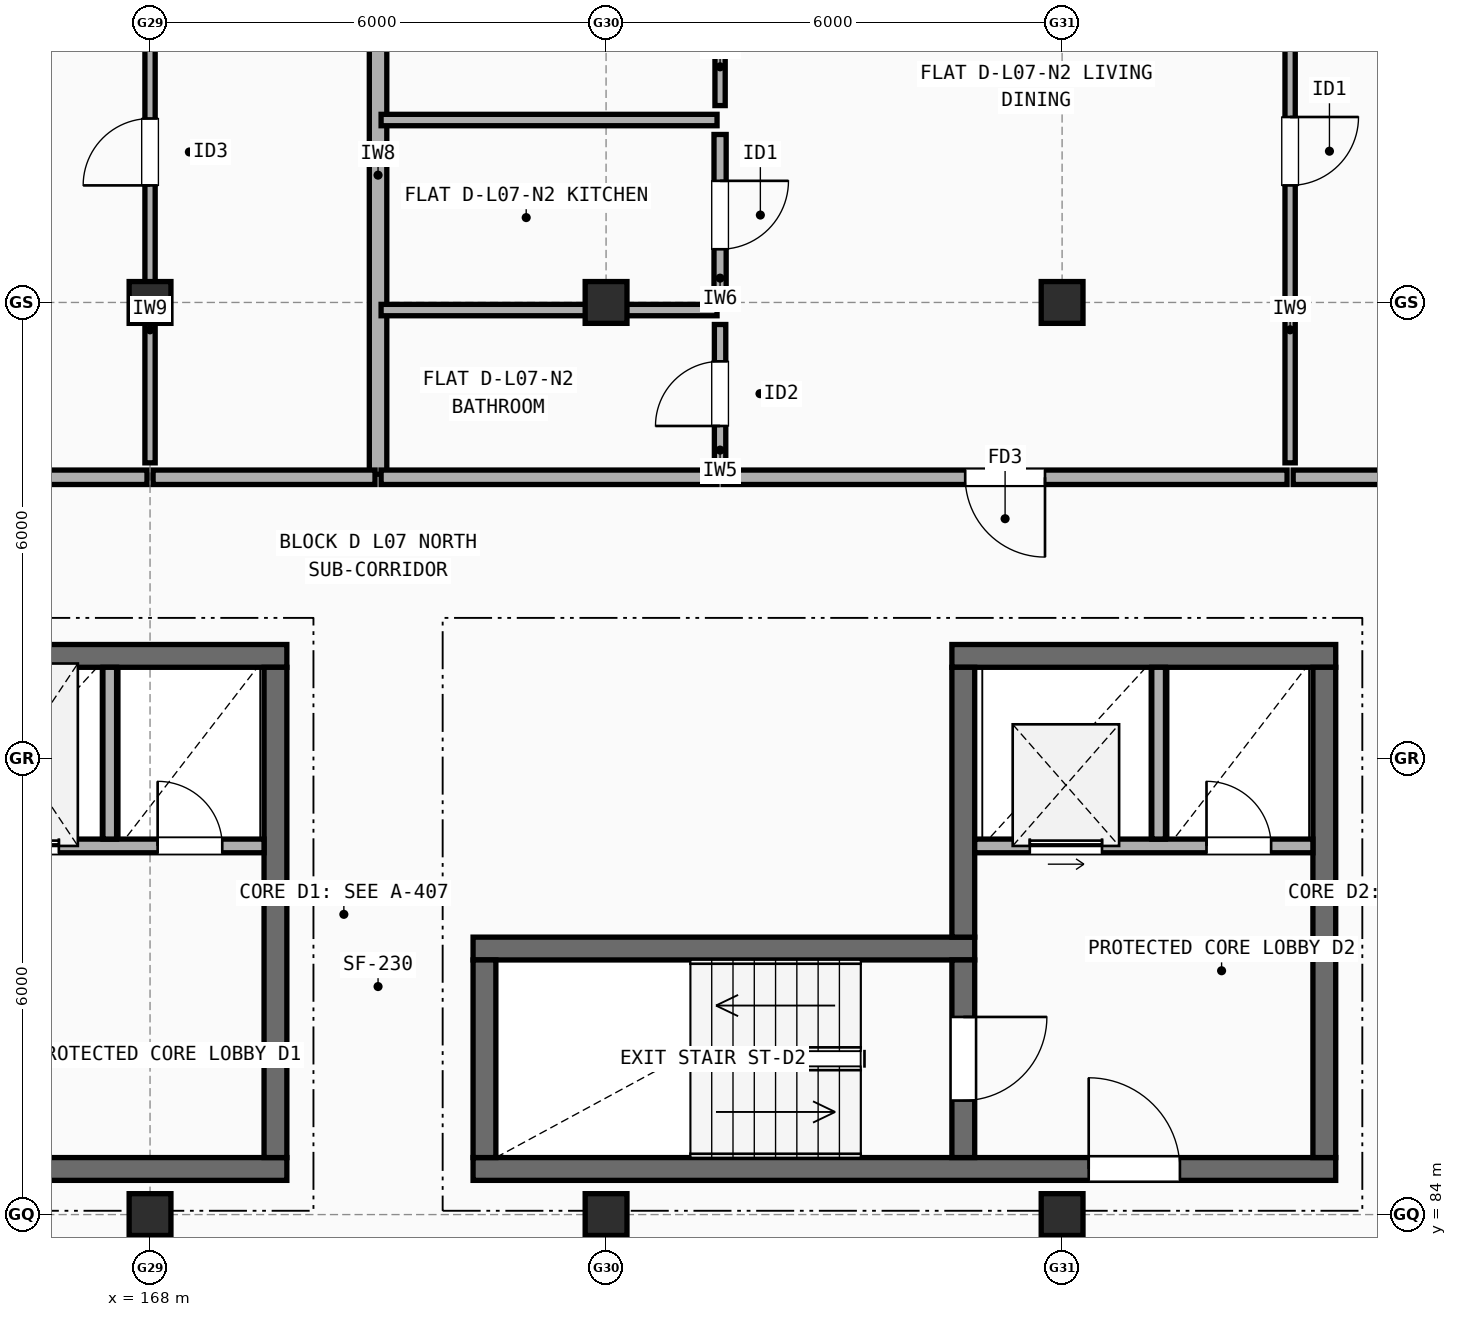
"""IFC4 building model, lengths in metres.
Left out: names, types, materials, properties, quantities, classifications, styles, units other than length and angle.
Written with IfcOpenShell. Run it as: python <this file> out.ifc"""

import sys

from ifc_helpers import new_model, si_unit, direction, frame, frame_2d, origin, origin_2d, place, context, subcontext, project, spatial, rectangle, extrude, element, fill, save


model = new_model("IFC4")
c1 = context("Model", 3, precision=1e-05, world=origin(), true_north=direction((0.0, 1.0)))
c2 = subcontext(c1, "Body", "Model", "MODEL_VIEW")
j1 = project(units=[si_unit("LENGTHUNIT", "METRE"), si_unit("PLANEANGLEUNIT", "RADIAN")], contexts=[c1])
p1 = place(None, origin())
s1 = spatial("IfcSite", under=j1, at=p1, CompositionType="ELEMENT")
p2 = place(p1, origin())
s2 = spatial("IfcBuilding", under=s1, at=p2, CompositionType="ELEMENT")
p3 = place(p2, frame((0.0, 0.0, 23.7)))
s3 = spatial("IfcBuildingStorey", under=s2, at=p3, CompositionType="ELEMENT", Elevation=23.7)
for number, where, z_axis, x_axis in (
    (1, (168.0, 84.0, 0.0), (0.0, 0.0, 1.0), (1.0, 0.0, 0.0)),
    (2, (168.0, 96.0, 0.0), (0.0, 0.0, 1.0), (1.0, 0.0, 0.0)),
    (3, (174.0, 84.0, 0.0), (0.0, 0.0, 1.0), (1.0, 0.0, 0.0)),
    (4, (174.0, 96.0, 0.0), (0.0, 0.0, 1.0), (1.0, 0.0, 0.0)),
    (5, (180.0, 84.0, 0.0), (0.0, 0.0, 1.0), (1.0, 0.0, 0.0)),
    (6, (180.0, 96.0, 0.0), (0.0, 0.0, 1.0), (1.0, 0.0, 0.0)),
):
    element("IfcColumn", number, at=place(p3, frame(where, z_axis=z_axis, x_axis=x_axis)), inside=s3, PredefinedType="COLUMN", context=c2, shape_type="SweptSolid", body=[
        extrude(rectangle(XDim=0.55, YDim=0.55, at=origin_2d()), origin(), (0.0, 0.0, 1.0), 2.975),
    ])
p4 = place(p3, frame((158.45, 84.6, 0.0), z_axis=(0.0, 0.0, 1.0), x_axis=(1.0, 0.0, 0.0)))
e7 = element("IfcWall", 7, at=p4, inside=s3, PredefinedType="SHEAR", context=c2, shape_type="SweptSolid", body=[
    extrude(rectangle(XDim=11.35, YDim=0.3, at=frame_2d((5.675, 0.0))), origin(), (0.0, 0.0, 1.0), 2.975),
])
p5 = place(p4, frame((5.1, 0.0, 0.0)))
e8 = element("IfcOpeningElement", 8, at=p5, cuts=e7, PredefinedType="OPENING", context=c2, shape_type="SweptSolid", body=[
    extrude(rectangle(XDim=1.15, YDim=2.15, at=frame_2d((0.575, 1.075))), frame((0.0, 0.16, 0.0), z_axis=(0.0, -1.0, 0.0), x_axis=(1.0, 0.0, 0.0)), (0.0, 0.0, 1.0), 0.32),
])
p6 = place(p3, frame((169.8, 91.35, 0.0), z_axis=(0.0, 0.0, 1.0), x_axis=(-1.0, 0.0, 0.0)))
e9 = element("IfcWall", 9, at=p6, inside=s3, PredefinedType="SHEAR", context=c2, shape_type="SweptSolid", body=[
    extrude(rectangle(XDim=5.05, YDim=0.3, at=frame_2d((2.525, 0.0))), origin(), (0.0, 0.0, 1.0), 2.975),
])
p7 = place(p3, frame((169.65, 84.75, 0.0), z_axis=(0.0, 0.0, 1.0), x_axis=(0.0, 1.0, 0.0)))
e10 = element("IfcWall", 10, at=p7, inside=s3, PredefinedType="SHEAR", context=c2, shape_type="SweptSolid", body=[
    extrude(rectangle(XDim=6.45, YDim=0.3, at=frame_2d((3.225, 0.0))), origin(), (0.0, 0.0, 1.0), 2.975),
])
p8 = place(p3, frame((165.05, 88.85, 0.0), z_axis=(0.0, 0.0, 1.0), x_axis=(1.0, 0.0, 0.0)))
e11 = element("IfcWall", 11, at=p8, inside=s3, PredefinedType="SOLIDWALL", context=c2, shape_type="SweptSolid", body=[
    extrude(rectangle(XDim=4.45, YDim=0.18, at=frame_2d((2.225, 0.0))), origin(), (0.0, 0.0, 1.0), 2.975),
])
p9 = place(p8, frame((0.65, 0.0, 0.0)))
e12 = element("IfcOpeningElement", 12, at=p9, cuts=e11, PredefinedType="OPENING", context=c2, shape_type="SweptSolid", body=[
    extrude(rectangle(XDim=1.1, YDim=2.15, at=frame_2d((0.55, 1.075))), frame((0.0, 0.1, 0.0), z_axis=(0.0, -1.0, 0.0), x_axis=(1.0, 0.0, 0.0)), (0.0, 0.0, 1.0), 0.2),
])
p10 = place(p8, frame((3.05, 0.0, 0.0)))
e13 = element("IfcOpeningElement", 13, at=p10, cuts=e11, PredefinedType="OPENING", context=c2, shape_type="SweptSolid", body=[
    extrude(rectangle(XDim=0.85, YDim=2.1, at=frame_2d((0.425, 1.05))), frame((0.0, 0.1, 0.0), z_axis=(0.0, -1.0, 0.0), x_axis=(1.0, 0.0, 0.0)), (0.0, 0.0, 1.0), 0.2),
])
p11 = place(p3, frame((167.47, 88.94, 0.0), z_axis=(0.0, 0.0, 1.0), x_axis=(0.0, 1.0, 0.0)))
e14 = element("IfcWall", 14, at=p11, inside=s3, PredefinedType="SOLIDWALL", context=c2, shape_type="SweptSolid", body=[
    extrude(rectangle(XDim=2.26, YDim=0.18, at=frame_2d((1.13, 0.0))), origin(), (0.0, 0.0, 1.0), 2.975),
])
p12 = place(p3, frame((172.25, 84.6, 0.0), z_axis=(0.0, 0.0, 1.0), x_axis=(1.0, 0.0, 0.0)))
e15 = element("IfcWall", 15, at=p12, inside=s3, PredefinedType="SHEAR", context=c2, shape_type="SweptSolid", body=[
    extrude(rectangle(XDim=11.35, YDim=0.3, at=frame_2d((5.675, 0.0))), origin(), (0.0, 0.0, 1.0), 2.975),
])
p13 = place(p12, frame((8.1, 0.0, 0.0)))
e16 = element("IfcOpeningElement", 16, at=p13, cuts=e15, PredefinedType="OPENING", context=c2, shape_type="SweptSolid", body=[
    extrude(rectangle(XDim=1.2, YDim=2.15, at=frame_2d((0.6, 1.075))), frame((0.0, 0.16, 0.0), z_axis=(0.0, -1.0, 0.0), x_axis=(1.0, 0.0, 0.0)), (0.0, 0.0, 1.0), 0.32),
])
p14 = place(p3, frame((178.85, 87.5, 0.0), z_axis=(0.0, 0.0, 1.0), x_axis=(-1.0, 0.0, 0.0)))
e17 = element("IfcWall", 17, at=p14, inside=s3, PredefinedType="SHEAR", context=c2, shape_type="SweptSolid", body=[
    extrude(rectangle(XDim=6.6, YDim=0.3, at=frame_2d((3.3, 0.0))), origin(), (0.0, 0.0, 1.0), 2.975),
])
p15 = place(p3, frame((172.4, 87.35, 0.0), z_axis=(0.0, 0.0, 1.0), x_axis=(0.0, -1.0, 0.0)))
e18 = element("IfcWall", 18, at=p15, inside=s3, PredefinedType="SHEAR", context=c2, shape_type="SweptSolid", body=[
    extrude(rectangle(XDim=2.6, YDim=0.3, at=frame_2d((1.3, 0.0))), origin(), (0.0, 0.0, 1.0), 2.975),
])
p16 = place(p3, frame((178.7, 84.75, 0.0), z_axis=(0.0, 0.0, 1.0), x_axis=(0.0, 1.0, 0.0)))
e19 = element("IfcWall", 19, at=p16, inside=s3, PredefinedType="SHEAR", context=c2, shape_type="SweptSolid", body=[
    extrude(rectangle(XDim=2.6, YDim=0.3, at=frame_2d((1.3, 0.0))), origin(), (0.0, 0.0, 1.0), 2.975),
])
p17 = place(p16, frame((0.75, 0.0, 0.0)))
e20 = element("IfcOpeningElement", 20, at=p17, cuts=e19, PredefinedType="OPENING", context=c2, shape_type="SweptSolid", body=[
    extrude(rectangle(XDim=1.1, YDim=2.15, at=frame_2d((0.55, 1.075))), frame((0.0, 0.16, 0.0), z_axis=(0.0, -1.0, 0.0), x_axis=(1.0, 0.0, 0.0)), (0.0, 0.0, 1.0), 0.32),
])
p18 = place(p3, frame((183.6, 91.35, 0.0), z_axis=(0.0, 0.0, 1.0), x_axis=(-1.0, 0.0, 0.0)))
e21 = element("IfcWall", 21, at=p18, inside=s3, PredefinedType="SHEAR", context=c2, shape_type="SweptSolid", body=[
    extrude(rectangle(XDim=5.05, YDim=0.3, at=frame_2d((2.525, 0.0))), origin(), (0.0, 0.0, 1.0), 2.975),
])
p19 = place(p3, frame((183.45, 84.75, 0.0), z_axis=(0.0, 0.0, 1.0), x_axis=(0.0, 1.0, 0.0)))
e22 = element("IfcWall", 22, at=p19, inside=s3, PredefinedType="SHEAR", context=c2, shape_type="SweptSolid", body=[
    extrude(rectangle(XDim=6.45, YDim=0.3, at=frame_2d((3.225, 0.0))), origin(), (0.0, 0.0, 1.0), 2.975),
])
p20 = place(p3, frame((178.7, 87.65, 0.0), z_axis=(0.0, 0.0, 1.0), x_axis=(0.0, 1.0, 0.0)))
e23 = element("IfcWall", 23, at=p20, inside=s3, PredefinedType="SHEAR", context=c2, shape_type="SweptSolid", body=[
    extrude(rectangle(XDim=3.55, YDim=0.3, at=frame_2d((1.775, 0.0))), origin(), (0.0, 0.0, 1.0), 2.975),
])
p21 = place(p3, frame((178.85, 88.85, 0.0), z_axis=(0.0, 0.0, 1.0), x_axis=(1.0, 0.0, 0.0)))
e24 = element("IfcWall", 24, at=p21, inside=s3, PredefinedType="SOLIDWALL", context=c2, shape_type="SweptSolid", body=[
    extrude(rectangle(XDim=4.45, YDim=0.18, at=frame_2d((2.225, 0.0))), origin(), (0.0, 0.0, 1.0), 2.975),
])
p22 = place(p21, frame((0.725, 0.0, 0.0)))
e25 = element("IfcOpeningElement", 25, at=p22, cuts=e24, PredefinedType="OPENING", context=c2, shape_type="SweptSolid", body=[
    extrude(rectangle(XDim=0.95, YDim=2.15, at=frame_2d((0.475, 1.075))), frame((0.0, 0.1, 0.0), z_axis=(0.0, -1.0, 0.0), x_axis=(1.0, 0.0, 0.0)), (0.0, 0.0, 1.0), 0.2),
])
p23 = place(p21, frame((3.05, 0.0, 0.0)))
e26 = element("IfcOpeningElement", 26, at=p23, cuts=e24, PredefinedType="OPENING", context=c2, shape_type="SweptSolid", body=[
    extrude(rectangle(XDim=0.85, YDim=2.1, at=frame_2d((0.425, 1.05))), frame((0.0, 0.1, 0.0), z_axis=(0.0, -1.0, 0.0), x_axis=(1.0, 0.0, 0.0)), (0.0, 0.0, 1.0), 0.2),
])
p24 = place(p3, frame((181.27, 88.94, 0.0), z_axis=(0.0, 0.0, 1.0), x_axis=(0.0, 1.0, 0.0)))
e27 = element("IfcWall", 27, at=p24, inside=s3, PredefinedType="SOLIDWALL", context=c2, shape_type="SweptSolid", body=[
    extrude(rectangle(XDim=2.26, YDim=0.18, at=frame_2d((1.13, 0.0))), origin(), (0.0, 0.0, 1.0), 2.975),
])
p25 = place(p3, frame((171.0, 93.74, 0.0), z_axis=(0.0, 0.0, 1.0), x_axis=(0.0, 1.0, 0.0)))
e28 = element("IfcWall", 28, at=p25, inside=s3, PredefinedType="SOLIDWALL", context=c2, shape_type="SweptSolid", body=[
    extrude(rectangle(XDim=7.87, YDim=0.23, at=frame_2d((3.935, 0.0))), origin(), (0.0, 0.0, 1.0), 2.548),
])
p26 = place(p3, frame((160.54, 93.7, 0.0), z_axis=(0.0, 0.0, 1.0), x_axis=(1.0, 0.0, 0.0)))
e29 = element("IfcWall", 29, at=p26, inside=s3, PredefinedType="SOLIDWALL", context=c2, shape_type="SweptSolid", body=[
    extrude(rectangle(XDim=7.42, YDim=0.19, at=frame_2d((3.71, 0.0))), origin(), (0.0, 0.0, 1.0), 2.508),
])
p27 = place(p26, frame((3.21, 0.0, 0.0)))
e30 = element("IfcOpeningElement", 30, at=p27, cuts=e29, PredefinedType="OPENING", context=c2, shape_type="SweptSolid", body=[
    extrude(rectangle(XDim=1.0, YDim=2.15, at=frame_2d((0.5, 1.075))), frame((0.0, 0.105, 0.0), z_axis=(0.0, -1.0, 0.0), x_axis=(1.0, 0.0, 0.0)), (0.0, 0.0, 1.0), 0.21),
])
p28 = place(p3, frame((168.04, 93.7, 0.0), z_axis=(0.0, 0.0, 1.0), x_axis=(1.0, 0.0, 0.0)))
e31 = element("IfcWall", 31, at=p28, inside=s3, PredefinedType="SOLIDWALL", context=c2, shape_type="SweptSolid", body=[
    extrude(rectangle(XDim=2.92, YDim=0.19, at=frame_2d((1.46, 0.0))), origin(), (0.0, 0.0, 1.0), 2.508),
])
p29 = place(p3, frame((168.0, 93.89, 0.0), z_axis=(0.0, 0.0, 1.0), x_axis=(0.0, 1.0, 0.0)))
e32 = element("IfcWall", 32, at=p29, inside=s3, PredefinedType="PARTITIONING", context=c2, shape_type="SweptSolid", body=[
    extrude(rectangle(XDim=7.6, YDim=0.135, at=frame_2d((3.8, 0.0))), origin(), (0.0, 0.0, 1.0), 2.508),
])
p30 = place(p29, frame((3.65, 0.0, 0.0)))
e33 = element("IfcOpeningElement", 33, at=p30, cuts=e32, PredefinedType="OPENING", context=c2, shape_type="SweptSolid", body=[
    extrude(rectangle(XDim=0.88, YDim=2.1, at=frame_2d((0.44, 1.05))), frame((0.0, 0.077, 0.0), z_axis=(0.0, -1.0, 0.0), x_axis=(1.0, 0.0, 0.0)), (0.0, 0.0, 1.0), 0.155),
])
p31 = place(p3, frame((171.04, 93.7, 0.0), z_axis=(0.0, 0.0, 1.0), x_axis=(1.0, 0.0, 0.0)))
e34 = element("IfcWall", 34, at=p31, inside=s3, PredefinedType="SOLIDWALL", context=c2, shape_type="SweptSolid", body=[
    extrude(rectangle(XDim=4.42, YDim=0.19, at=frame_2d((2.21, 0.0))), origin(), (0.0, 0.0, 1.0), 2.975),
])
p32 = place(p3, frame((175.54, 93.7, 0.0), z_axis=(0.0, 0.0, 1.0), x_axis=(1.0, 0.0, 0.0)))
e35 = element("IfcWall", 35, at=p32, inside=s3, PredefinedType="SOLIDWALL", context=c2, shape_type="SweptSolid", body=[
    extrude(rectangle(XDim=7.42, YDim=0.19, at=frame_2d((3.71, 0.0))), origin(), (0.0, 0.0, 1.0), 2.975),
])
p33 = place(p32, frame((3.185, 0.0, 0.0)))
e36 = element("IfcOpeningElement", 36, at=p33, cuts=e35, PredefinedType="OPENING", context=c2, shape_type="SweptSolid", body=[
    extrude(rectangle(XDim=1.05, YDim=2.15, at=frame_2d((0.525, 1.075))), frame((0.0, 0.105, 0.0), z_axis=(0.0, -1.0, 0.0), x_axis=(1.0, 0.0, 0.0)), (0.0, 0.0, 1.0), 0.21),
])
p34 = place(p3, frame((175.5, 98.59, 0.0), z_axis=(0.0, 0.0, 1.0), x_axis=(0.0, 1.0, 0.0)))
e37 = element("IfcWall", 37, at=p34, inside=s3, PredefinedType="PARTITIONING", context=c2, shape_type="SweptSolid", body=[
    extrude(rectangle(XDim=3.22, YDim=0.135, at=frame_2d((1.61, 0.0))), origin(), (0.0, 0.0, 1.0), 2.975),
])
p35 = place(p34, frame((1.17, 0.0, 0.0)))
e38 = element("IfcOpeningElement", 38, at=p35, cuts=e37, PredefinedType="OPENING", context=c2, shape_type="SweptSolid", body=[
    extrude(rectangle(XDim=0.88, YDim=2.1, at=frame_2d((0.44, 1.05))), frame((0.0, 0.077, 0.0), z_axis=(0.0, -1.0, 0.0), x_axis=(1.0, 0.0, 0.0)), (0.0, 0.0, 1.0), 0.155),
])
p36 = place(p3, frame((175.5, 96.09, 0.0), z_axis=(0.0, 0.0, 1.0), x_axis=(0.0, 1.0, 0.0)))
e39 = element("IfcWall", 39, at=p36, inside=s3, PredefinedType="PLUMBINGWALL", context=c2, shape_type="SweptSolid", body=[
    extrude(rectangle(XDim=2.12, YDim=0.16, at=frame_2d((1.06, 0.0))), origin(), (0.0, 0.0, 1.0), 2.975),
])
p37 = place(p36, frame((0.61, 0.0, 0.0)))
e40 = element("IfcOpeningElement", 40, at=p37, cuts=e39, PredefinedType="OPENING", context=c2, shape_type="SweptSolid", body=[
    extrude(rectangle(XDim=0.9, YDim=2.1, at=frame_2d((0.45, 1.05))), frame((0.0, 0.09, 0.0), z_axis=(0.0, -1.0, 0.0), x_axis=(1.0, 0.0, 0.0)), (0.0, 0.0, 1.0), 0.18),
])
p38 = place(p3, frame((175.5, 93.89, 0.0), z_axis=(0.0, 0.0, 1.0), x_axis=(0.0, 1.0, 0.0)))
e41 = element("IfcWall", 41, at=p38, inside=s3, PredefinedType="PARTITIONING", context=c2, shape_type="SweptSolid", body=[
    extrude(rectangle(XDim=1.82, YDim=0.15, at=frame_2d((0.91, 0.0))), origin(), (0.0, 0.0, 1.0), 2.975),
])
p39 = place(p38, frame((0.485, 0.0, 0.0)))
e42 = element("IfcOpeningElement", 42, at=p39, cuts=e41, PredefinedType="OPENING", context=c2, shape_type="SweptSolid", body=[
    extrude(rectangle(XDim=0.85, YDim=2.1, at=frame_2d((0.425, 1.05))), frame((0.0, 0.085, 0.0), z_axis=(0.0, -1.0, 0.0), x_axis=(1.0, 0.0, 0.0)), (0.0, 0.0, 1.0), 0.17),
])
p40 = place(p3, frame((171.04, 98.4, 0.0), z_axis=(0.0, 0.0, 1.0), x_axis=(1.0, 0.0, 0.0)))
e43 = element("IfcWall", 43, at=p40, inside=s3, PredefinedType="PARTITIONING", context=c2, shape_type="SweptSolid", body=[
    extrude(rectangle(XDim=4.42, YDim=0.15, at=frame_2d((2.21, 0.0))), origin(), (0.0, 0.0, 1.0), 2.548),
])
p41 = place(p3, frame((171.04, 95.9, 0.0), z_axis=(0.0, 0.0, 1.0), x_axis=(1.0, 0.0, 0.0)))
e44 = element("IfcWall", 44, at=p41, inside=s3, PredefinedType="PARTITIONING", context=c2, shape_type="SweptSolid", body=[
    extrude(rectangle(XDim=4.42, YDim=0.15, at=frame_2d((2.21, 0.0))), origin(), (0.0, 0.0, 1.0), 2.508),
])
p42 = place(p3, frame((183.04, 93.7, 0.0), z_axis=(0.0, 0.0, 1.0), x_axis=(1.0, 0.0, 0.0)))
e45 = element("IfcWall", 45, at=p42, inside=s3, PredefinedType="SOLIDWALL", context=c2, shape_type="SweptSolid", body=[
    extrude(rectangle(XDim=2.92, YDim=0.19, at=frame_2d((1.46, 0.0))), origin(), (0.0, 0.0, 1.0), 2.457),
])
p43 = place(p3, frame((183.0, 93.89, 0.0), z_axis=(0.0, 0.0, 1.0), x_axis=(0.0, 1.0, 0.0)))
e46 = element("IfcWall", 46, at=p43, inside=s3, PredefinedType="PARTITIONING", context=c2, shape_type="SweptSolid", body=[
    extrude(rectangle(XDim=7.92, YDim=0.135, at=frame_2d((3.96, 0.0))), origin(), (0.0, 0.0, 1.0), 2.408),
])
p44 = place(p43, frame((3.65, 0.0, 0.0)))
e47 = element("IfcOpeningElement", 47, at=p44, cuts=e46, PredefinedType="OPENING", context=c2, shape_type="SweptSolid", body=[
    extrude(rectangle(XDim=0.9, YDim=2.1, at=frame_2d((0.45, 1.05))), frame((0.0, 0.077, 0.0), z_axis=(0.0, -1.0, 0.0), x_axis=(1.0, 0.0, 0.0)), (0.0, 0.0, 1.0), 0.155),
])
p45 = place(p9, origin())
e48 = element("IfcDoor", 48, at=p45, inside=s3, OperationType="SLIDING_TO_LEFT", PredefinedType="DOOR", context=c2, shape_type="SweptSolid", body=[
    extrude(rectangle(XDim=1.1, YDim=2.15, at=frame_2d((0.55, 1.075))), frame((0.0, 0.025, 0.0), z_axis=(0.0, -1.0, 0.0), x_axis=(1.0, 0.0, 0.0)), (0.0, 0.0, 1.0), 0.05),
])
fill(e12, e48)
p46 = place(p10, frame((0.85, 0.0, 0.0), z_axis=(0.0, 0.0, 1.0), x_axis=(-1.0, 0.0, 0.0)))
e49 = element("IfcDoor", 49, at=p46, inside=s3, OperationType="SINGLE_SWING_LEFT", PredefinedType="DOOR", context=c2, shape_type="SweptSolid", body=[
    extrude(rectangle(XDim=0.85, YDim=2.1, at=frame_2d((0.425, 1.05))), frame((0.0, 0.025, 0.0), z_axis=(0.0, -1.0, 0.0), x_axis=(1.0, 0.0, 0.0)), (0.0, 0.0, 1.0), 0.05),
])
fill(e13, e49)
p47 = place(p13, origin())
e50 = element("IfcDoor", 50, at=p47, inside=s3, OperationType="SINGLE_SWING_LEFT", PredefinedType="DOOR", context=c2, shape_type="SweptSolid", body=[
    extrude(rectangle(XDim=1.2, YDim=2.15, at=frame_2d((0.6, 1.075))), frame((0.0, 0.025, 0.0), z_axis=(0.0, -1.0, 0.0), x_axis=(1.0, 0.0, 0.0)), (0.0, 0.0, 1.0), 0.05),
])
fill(e16, e50)
p48 = place(p17, origin())
e51 = element("IfcDoor", 51, at=p48, inside=s3, OperationType="SINGLE_SWING_RIGHT", PredefinedType="DOOR", context=c2, shape_type="SweptSolid", body=[
    extrude(rectangle(XDim=1.1, YDim=2.15, at=frame_2d((0.55, 1.075))), frame((0.0, 0.025, 0.0), z_axis=(0.0, -1.0, 0.0), x_axis=(1.0, 0.0, 0.0)), (0.0, 0.0, 1.0), 0.05),
])
fill(e20, e51)
p49 = place(p22, origin())
e52 = element("IfcDoor", 52, at=p49, inside=s3, OperationType="SLIDING_TO_LEFT", PredefinedType="DOOR", context=c2, shape_type="SweptSolid", body=[
    extrude(rectangle(XDim=0.95, YDim=2.15, at=frame_2d((0.475, 1.075))), frame((0.0, 0.025, 0.0), z_axis=(0.0, -1.0, 0.0), x_axis=(1.0, 0.0, 0.0)), (0.0, 0.0, 1.0), 0.05),
])
fill(e25, e52)
p50 = place(p23, frame((0.85, 0.0, 0.0), z_axis=(0.0, 0.0, 1.0), x_axis=(-1.0, 0.0, 0.0)))
e53 = element("IfcDoor", 53, at=p50, inside=s3, OperationType="SINGLE_SWING_LEFT", PredefinedType="DOOR", context=c2, shape_type="SweptSolid", body=[
    extrude(rectangle(XDim=0.85, YDim=2.1, at=frame_2d((0.425, 1.05))), frame((0.0, 0.025, 0.0), z_axis=(0.0, -1.0, 0.0), x_axis=(1.0, 0.0, 0.0)), (0.0, 0.0, 1.0), 0.05),
])
fill(e26, e53)
p51 = place(p30, origin())
e54 = element("IfcDoor", 54, at=p51, inside=s3, OperationType="SINGLE_SWING_LEFT", PredefinedType="DOOR", context=c2, shape_type="SweptSolid", body=[
    extrude(rectangle(XDim=0.88, YDim=2.1, at=frame_2d((0.44, 1.05))), frame((0.0, 0.025, 0.0), z_axis=(0.0, -1.0, 0.0), x_axis=(1.0, 0.0, 0.0)), (0.0, 0.0, 1.0), 0.05),
])
fill(e33, e54)
p52 = place(p33, origin())
e55 = element("IfcDoor", 55, at=p52, inside=s3, OperationType="SINGLE_SWING_RIGHT", PredefinedType="DOOR", context=c2, shape_type="SweptSolid", body=[
    extrude(rectangle(XDim=1.05, YDim=2.15, at=frame_2d((0.525, 1.075))), frame((0.0, 0.025, 0.0), z_axis=(0.0, -1.0, 0.0), x_axis=(1.0, 0.0, 0.0)), (0.0, 0.0, 1.0), 0.05),
])
fill(e36, e55)
p53 = place(p37, origin())
e56 = element("IfcDoor", 56, at=p53, inside=s3, OperationType="SINGLE_SWING_RIGHT", PredefinedType="DOOR", context=c2, shape_type="SweptSolid", body=[
    extrude(rectangle(XDim=0.9, YDim=2.1, at=frame_2d((0.45, 1.05))), frame((0.0, 0.025, 0.0), z_axis=(0.0, -1.0, 0.0), x_axis=(1.0, 0.0, 0.0)), (0.0, 0.0, 1.0), 0.05),
])
fill(e40, e56)
p54 = place(p39, origin())
e57 = element("IfcDoor", 57, at=p54, inside=s3, OperationType="SINGLE_SWING_LEFT", PredefinedType="DOOR", context=c2, shape_type="SweptSolid", body=[
    extrude(rectangle(XDim=0.85, YDim=2.1, at=frame_2d((0.425, 1.05))), frame((0.0, 0.025, 0.0), z_axis=(0.0, -1.0, 0.0), x_axis=(1.0, 0.0, 0.0)), (0.0, 0.0, 1.0), 0.05),
])
fill(e42, e57)
p55 = place(p44, origin())
e58 = element("IfcDoor", 58, at=p55, inside=s3, OperationType="SINGLE_SWING_RIGHT", PredefinedType="DOOR", context=c2, shape_type="SweptSolid", body=[
    extrude(rectangle(XDim=0.9, YDim=2.1, at=frame_2d((0.45, 1.05))), frame((0.0, 0.025, 0.0), z_axis=(0.0, -1.0, 0.0), x_axis=(1.0, 0.0, 0.0)), (0.0, 0.0, 1.0), 0.05),
])
fill(e47, e58)
save(model, sys.argv[1])
